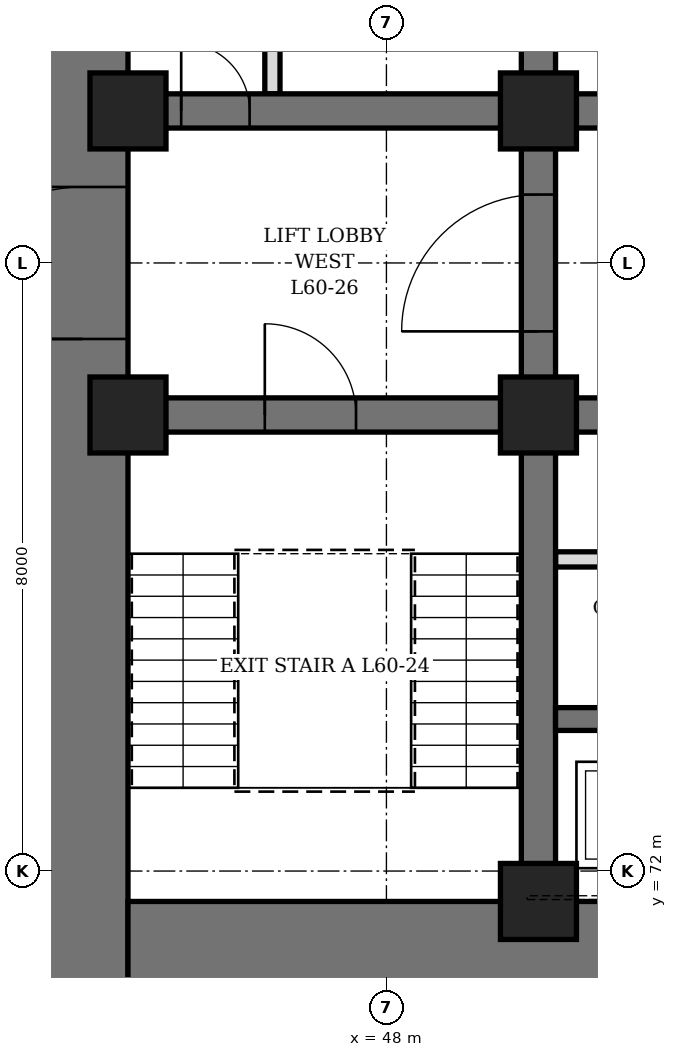
"""IFC4 building model, lengths in metres.
Left out: names, types, materials, properties, quantities, classifications, styles, units other than length and angle.
Written with IfcOpenShell. Run it as: python <this file> out.ifc"""

import sys

from ifc_helpers import new_model, si_unit, direction, frame, frame_2d, origin, origin_2d, place, context, subcontext, project, spatial, rectangle, hollow_rectangle, extrude, element, fill, save


model = new_model("IFC4")
c1 = context("Model", 3, precision=1e-05, world=origin(), true_north=direction((0.0, 1.0)))
c2 = subcontext(c1, "Body", "Model", "MODEL_VIEW")
j1 = project(units=[si_unit("LENGTHUNIT", "METRE"), si_unit("PLANEANGLEUNIT", "RADIAN")], contexts=[c1])
p1 = place(None, origin())
s1 = spatial("IfcSite", under=j1, at=p1, CompositionType="ELEMENT")
p2 = place(p1, origin())
s2 = spatial("IfcBuilding", under=s1, at=p2, CompositionType="ELEMENT")
p3 = place(p2, frame((0.0, 0.0, 267.1)))
s3 = spatial("IfcBuildingStorey", under=s2, at=p3, CompositionType="ELEMENT", Elevation=267.1)
p4 = place(p3, frame((44.0, 70.4, 0.0), z_axis=(0.0, 0.0, 1.0), x_axis=(0.0, 1.0, 0.0)))
e1 = element("IfcWall", 1, at=p4, inside=s3, PredefinedType="SHEAR", context=c2, shape_type="SweptSolid", body=[
    extrude(rectangle(XDim=19.2, YDim=1.2, at=frame_2d((9.6, 0.0))), origin(), (0.0, 0.0, 1.0), 4.2),
])
p5 = place(p4, frame((8.6, 0.0, 0.0)))
e2 = element("IfcOpeningElement", 2, at=p5, cuts=e1, PredefinedType="OPENING", context=c2, shape_type="SweptSolid", body=[
    extrude(rectangle(XDim=2.0, YDim=2.4, at=frame_2d((1.0, 1.2))), frame((0.0, 0.61, 0.0), z_axis=(0.0, -1.0, 0.0), x_axis=(1.0, 0.0, 0.0)), (0.0, 0.0, 1.0), 1.22),
])
p6 = place(p3, frame((44.6, 71.0, 0.0), z_axis=(0.0, 0.0, 1.0), x_axis=(1.0, 0.0, 0.0)))
e3 = element("IfcWall", 3, at=p6, inside=s3, PredefinedType="SHEAR", context=c2, shape_type="SweptSolid", body=[
    extrude(rectangle(XDim=22.8, YDim=1.2, at=frame_2d((11.4, 0.0))), origin(), (0.0, 0.0, 1.0), 4.2),
])
p7 = place(p6, frame((6.35, 0.0, 0.0)))
e4 = element("IfcOpeningElement", 4, at=p7, cuts=e3, PredefinedType="OPENING", context=c2, shape_type="SweptSolid", body=[
    extrude(rectangle(XDim=1.1, YDim=2.2, at=frame_2d((0.55, 1.1))), frame((0.0, 0.61, 0.0), z_axis=(0.0, -1.0, 0.0), x_axis=(1.0, 0.0, 0.0)), (0.0, 0.0, 1.0), 1.22),
])
p8 = place(p6, frame((9.35, 0.0, 0.0)))
e5 = element("IfcOpeningElement", 5, at=p8, cuts=e3, PredefinedType="OPENING", context=c2, shape_type="SweptSolid", body=[
    extrude(rectangle(XDim=1.1, YDim=2.2, at=frame_2d((0.55, 1.1))), frame((0.0, 0.61, 0.0), z_axis=(0.0, -1.0, 0.0), x_axis=(1.0, 0.0, 0.0)), (0.0, 0.0, 1.0), 1.22),
])
p9 = place(p6, frame((12.35, 0.0, 0.0)))
e6 = element("IfcOpeningElement", 6, at=p9, cuts=e3, PredefinedType="OPENING", context=c2, shape_type="SweptSolid", body=[
    extrude(rectangle(XDim=1.1, YDim=2.2, at=frame_2d((0.55, 1.1))), frame((0.0, 0.61, 0.0), z_axis=(0.0, -1.0, 0.0), x_axis=(1.0, 0.0, 0.0)), (0.0, 0.0, 1.0), 1.22),
])
p10 = place(p6, frame((15.35, 0.0, 0.0)))
e7 = element("IfcOpeningElement", 7, at=p10, cuts=e3, PredefinedType="OPENING", context=c2, shape_type="SweptSolid", body=[
    extrude(rectangle(XDim=1.1, YDim=2.2, at=frame_2d((0.55, 1.1))), frame((0.0, 0.61, 0.0), z_axis=(0.0, -1.0, 0.0), x_axis=(1.0, 0.0, 0.0)), (0.0, 0.0, 1.0), 1.22),
])
p11 = place(p3, frame((50.0, 71.6, 0.0), z_axis=(0.0, 0.0, 1.0), x_axis=(0.0, 1.0, 0.0)))
e8 = element("IfcWall", 8, at=p11, inside=s3, PredefinedType="SHEAR", context=c2, shape_type="SweptSolid", body=[
    extrude(rectangle(XDim=16.8, YDim=0.45, at=frame_2d((8.4, 0.0))), origin(), (0.0, 0.0, 1.0), 4.2),
])
p12 = place(p11, frame((7.5, 0.0, 0.0)))
e9 = element("IfcOpeningElement", 9, at=p12, cuts=e8, PredefinedType="OPENING", context=c2, shape_type="SweptSolid", body=[
    extrude(rectangle(XDim=1.8, YDim=2.4, at=frame_2d((0.9, 1.2))), frame((0.0, 0.235, 0.0), z_axis=(0.0, -1.0, 0.0), x_axis=(1.0, 0.0, 0.0)), (0.0, 0.0, 1.0), 0.47),
])
p13 = place(p3, frame((44.6, 78.0, 0.0), z_axis=(0.0, 0.0, 1.0), x_axis=(1.0, 0.0, 0.0)))
e10 = element("IfcWall", 10, at=p13, inside=s3, PredefinedType="SHEAR", context=c2, shape_type="SweptSolid", body=[
    extrude(rectangle(XDim=5.175, YDim=0.45, at=frame_2d((2.587, 0.0))), origin(), (0.0, 0.0, 1.0), 4.2),
])
p14 = place(p13, frame((1.8, 0.0, 0.0)))
e11 = element("IfcOpeningElement", 11, at=p14, cuts=e10, PredefinedType="OPENING", context=c2, shape_type="SweptSolid", body=[
    extrude(rectangle(XDim=1.2, YDim=2.1, at=frame_2d((0.6, 1.05))), frame((0.0, 0.235, 0.0), z_axis=(0.0, -1.0, 0.0), x_axis=(1.0, 0.0, 0.0)), (0.0, 0.0, 1.0), 0.47),
])
p15 = place(p3, frame((44.6, 82.0, 0.0), z_axis=(0.0, 0.0, 1.0), x_axis=(1.0, 0.0, 0.0)))
e12 = element("IfcWall", 12, at=p15, inside=s3, PredefinedType="SHEAR", context=c2, shape_type="SweptSolid", body=[
    extrude(rectangle(XDim=5.175, YDim=0.45, at=frame_2d((2.587, 0.0))), origin(), (0.0, 0.0, 1.0), 4.2),
])
p16 = place(p15, frame((0.7, 0.0, 0.0)))
e13 = element("IfcOpeningElement", 13, at=p16, cuts=e12, PredefinedType="OPENING", context=c2, shape_type="SweptSolid", body=[
    extrude(rectangle(XDim=0.9, YDim=2.1, at=frame_2d((0.45, 1.05))), frame((0.0, 0.235, 0.0), z_axis=(0.0, -1.0, 0.0), x_axis=(1.0, 0.0, 0.0)), (0.0, 0.0, 1.0), 0.47),
])
p17 = place(p3, frame((50.225, 78.0, 0.0), z_axis=(0.0, 0.0, 1.0), x_axis=(1.0, 0.0, 0.0)))
e14 = element("IfcWall", 14, at=p17, inside=s3, PredefinedType="SHEAR", context=c2, shape_type="SweptSolid", body=[
    extrude(rectangle(XDim=11.55, YDim=0.45, at=frame_2d((5.775, 0.0))), origin(), (0.0, 0.0, 1.0), 4.2),
])
p18 = place(p17, frame((0.825, 0.0, 0.0)))
e15 = element("IfcOpeningElement", 15, at=p18, cuts=e14, PredefinedType="OPENING", context=c2, shape_type="SweptSolid", body=[
    extrude(rectangle(XDim=0.9, YDim=2.1, at=frame_2d((0.45, 1.05))), frame((0.0, 0.235, 0.0), z_axis=(0.0, -1.0, 0.0), x_axis=(1.0, 0.0, 0.0)), (0.0, 0.0, 1.0), 0.47),
])
p19 = place(p17, frame((3.825, 0.0, 0.0)))
e16 = element("IfcOpeningElement", 16, at=p19, cuts=e14, PredefinedType="OPENING", context=c2, shape_type="SweptSolid", body=[
    extrude(rectangle(XDim=0.9, YDim=2.1, at=frame_2d((0.45, 1.05))), frame((0.0, 0.235, 0.0), z_axis=(0.0, -1.0, 0.0), x_axis=(1.0, 0.0, 0.0)), (0.0, 0.0, 1.0), 0.47),
])
p20 = place(p17, frame((6.825, 0.0, 0.0)))
e17 = element("IfcOpeningElement", 17, at=p20, cuts=e14, PredefinedType="OPENING", context=c2, shape_type="SweptSolid", body=[
    extrude(rectangle(XDim=0.9, YDim=2.1, at=frame_2d((0.45, 1.05))), frame((0.0, 0.235, 0.0), z_axis=(0.0, -1.0, 0.0), x_axis=(1.0, 0.0, 0.0)), (0.0, 0.0, 1.0), 0.47),
])
p21 = place(p17, frame((9.825, 0.0, 0.0)))
e18 = element("IfcOpeningElement", 18, at=p21, cuts=e14, PredefinedType="OPENING", context=c2, shape_type="SweptSolid", body=[
    extrude(rectangle(XDim=0.9, YDim=2.1, at=frame_2d((0.45, 1.05))), frame((0.0, 0.235, 0.0), z_axis=(0.0, -1.0, 0.0), x_axis=(1.0, 0.0, 0.0)), (0.0, 0.0, 1.0), 0.47),
])
p22 = place(p3, frame((50.225, 82.0, 0.0), z_axis=(0.0, 0.0, 1.0), x_axis=(1.0, 0.0, 0.0)))
e19 = element("IfcWall", 19, at=p22, inside=s3, PredefinedType="SHEAR", context=c2, shape_type="SweptSolid", body=[
    extrude(rectangle(XDim=11.55, YDim=0.45, at=frame_2d((5.775, 0.0))), origin(), (0.0, 0.0, 1.0), 4.2),
])
p23 = place(p22, frame((0.825, 0.0, 0.0)))
e20 = element("IfcOpeningElement", 20, at=p23, cuts=e19, PredefinedType="OPENING", context=c2, shape_type="SweptSolid", body=[
    extrude(rectangle(XDim=0.9, YDim=2.1, at=frame_2d((0.45, 1.05))), frame((0.0, 0.235, 0.0), z_axis=(0.0, -1.0, 0.0), x_axis=(1.0, 0.0, 0.0)), (0.0, 0.0, 1.0), 0.47),
])
p24 = place(p22, frame((3.825, 0.0, 0.0)))
e21 = element("IfcOpeningElement", 21, at=p24, cuts=e19, PredefinedType="OPENING", context=c2, shape_type="SweptSolid", body=[
    extrude(rectangle(XDim=0.9, YDim=2.1, at=frame_2d((0.45, 1.05))), frame((0.0, 0.235, 0.0), z_axis=(0.0, -1.0, 0.0), x_axis=(1.0, 0.0, 0.0)), (0.0, 0.0, 1.0), 0.47),
])
p25 = place(p22, frame((6.825, 0.0, 0.0)))
e22 = element("IfcOpeningElement", 22, at=p25, cuts=e19, PredefinedType="OPENING", context=c2, shape_type="SweptSolid", body=[
    extrude(rectangle(XDim=0.9, YDim=2.1, at=frame_2d((0.45, 1.05))), frame((0.0, 0.235, 0.0), z_axis=(0.0, -1.0, 0.0), x_axis=(1.0, 0.0, 0.0)), (0.0, 0.0, 1.0), 0.47),
])
p26 = place(p22, frame((9.825, 0.0, 0.0)))
e23 = element("IfcOpeningElement", 23, at=p26, cuts=e19, PredefinedType="OPENING", context=c2, shape_type="SweptSolid", body=[
    extrude(rectangle(XDim=0.9, YDim=2.1, at=frame_2d((0.45, 1.05))), frame((0.0, 0.235, 0.0), z_axis=(0.0, -1.0, 0.0), x_axis=(1.0, 0.0, 0.0)), (0.0, 0.0, 1.0), 0.47),
])
p27 = place(p3, frame((50.225, 74.0, 0.0), z_axis=(0.0, 0.0, 1.0), x_axis=(1.0, 0.0, 0.0)))
e24 = element("IfcWall", 24, at=p27, inside=s3, PredefinedType="SHEAR", context=c2, shape_type="SweptSolid", body=[
    extrude(rectangle(XDim=11.55, YDim=0.3, at=frame_2d((5.775, 0.0))), origin(), (0.0, 0.0, 1.0), 4.2),
])
for number, where, z_axis, x_axis in (
    (25, (44.6, 78.0, 0.0), (0.0, 0.0, 1.0), (1.0, 0.0, 0.0)),
    (26, (44.6, 82.0, 0.0), (0.0, 0.0, 1.0), (1.0, 0.0, 0.0)),
    (27, (50.0, 71.6, 0.0), (0.0, 0.0, 1.0), (1.0, 0.0, 0.0)),
    (28, (50.0, 78.0, 0.0), (0.0, 0.0, 1.0), (1.0, 0.0, 0.0)),
    (29, (50.0, 82.0, 0.0), (0.0, 0.0, 1.0), (1.0, 0.0, 0.0)),
):
    element("IfcColumn", number, at=place(p3, frame(where, z_axis=z_axis, x_axis=x_axis)), inside=s3, PredefinedType="COLUMN", context=c2, shape_type="SweptSolid", body=[
        extrude(hollow_rectangle(XDim=1.0, YDim=1.0, WallThickness=0.15, at=origin_2d()), origin(), (0.0, 0.0, 1.0), 4.2),
    ])
p28 = place(p3, frame((46.5, 82.225, 0.0), z_axis=(0.0, 0.0, 1.0), x_axis=(0.0, 1.0, 0.0)))
e30 = element("IfcWall", 30, at=p28, inside=s3, PredefinedType="PARTITIONING", context=c2, shape_type="SweptSolid", body=[
    extrude(rectangle(XDim=3.05, YDim=0.2, at=frame_2d((1.525, 0.0))), origin(), (0.0, 0.0, 1.0), 4.04),
])
p29 = place(p28, frame((1.075, 0.0, 0.0)))
e31 = element("IfcOpeningElement", 31, at=p29, cuts=e30, PredefinedType="OPENING", context=c2, shape_type="SweptSolid", body=[
    extrude(rectangle(XDim=0.9, YDim=2.1, at=frame_2d((0.45, 1.05))), frame((0.0, 0.11, 0.0), z_axis=(0.0, -1.0, 0.0), x_axis=(1.0, 0.0, 0.0)), (0.0, 0.0, 1.0), 0.22),
])
p30 = place(p3, frame((50.225, 76.1, 0.0), z_axis=(0.0, 0.0, 1.0), x_axis=(1.0, 0.0, 0.0)))
e32 = element("IfcWall", 32, at=p30, inside=s3, PredefinedType="PARTITIONING", context=c2, shape_type="SweptSolid", body=[
    extrude(rectangle(XDim=2.55, YDim=0.2, at=frame_2d((1.275, 0.0))), origin(), (0.0, 0.0, 1.0), 4.04),
])
p31 = place(p30, frame((0.825, 0.0, 0.0)))
e33 = element("IfcOpeningElement", 33, at=p31, cuts=e32, PredefinedType="OPENING", context=c2, shape_type="SweptSolid", body=[
    extrude(rectangle(XDim=0.9, YDim=2.1, at=frame_2d((0.45, 1.05))), frame((0.0, 0.11, 0.0), z_axis=(0.0, -1.0, 0.0), x_axis=(1.0, 0.0, 0.0)), (0.0, 0.0, 1.0), 0.22),
])
p32 = place(p16, origin())
e34 = element("IfcDoor", 34, at=p32, inside=s3, OperationType="SINGLE_SWING_LEFT", PredefinedType="DOOR", context=c2, shape_type="SweptSolid", body=[
    extrude(rectangle(XDim=0.9, YDim=2.1, at=frame_2d((0.45, 1.05))), frame((0.0, 0.225, 0.0), z_axis=(0.0, -1.0, 0.0), x_axis=(1.0, 0.0, 0.0)), (0.0, 0.0, 1.0), 0.449),
])
fill(e13, e34)
p33 = place(p14, origin())
e35 = element("IfcDoor", 35, at=p33, inside=s3, OperationType="SINGLE_SWING_LEFT", PredefinedType="DOOR", context=c2, shape_type="SweptSolid", body=[
    extrude(rectangle(XDim=1.2, YDim=2.1, at=frame_2d((0.6, 1.05))), frame((0.0, 0.225, 0.0), z_axis=(0.0, -1.0, 0.0), x_axis=(1.0, 0.0, 0.0)), (0.0, 0.0, 1.0), 0.449),
])
fill(e11, e35)
p34 = place(p5, origin())
e36 = element("IfcDoor", 36, at=p34, inside=s3, OperationType="DOUBLE_DOOR_SINGLE_SWING", PredefinedType="DOOR", context=c2, shape_type="SweptSolid", body=[
    extrude(rectangle(XDim=2.0, YDim=2.4, at=frame_2d((1.0, 1.2))), frame((0.0, 0.35, 0.0), z_axis=(0.0, -1.0, 0.0), x_axis=(1.0, 0.0, 0.0)), (0.0, 0.0, 1.0), 0.7),
])
fill(e2, e36)
p35 = place(p12, origin())
e37 = element("IfcDoor", 37, at=p35, inside=s3, OperationType="DOUBLE_DOOR_SINGLE_SWING", PredefinedType="DOOR", context=c2, shape_type="SweptSolid", body=[
    extrude(rectangle(XDim=1.8, YDim=2.4, at=frame_2d((0.9, 1.2))), frame((0.0, 0.225, 0.0), z_axis=(0.0, -1.0, 0.0), x_axis=(1.0, 0.0, 0.0)), (0.0, 0.0, 1.0), 0.449),
])
fill(e9, e37)
save(model, sys.argv[1])
